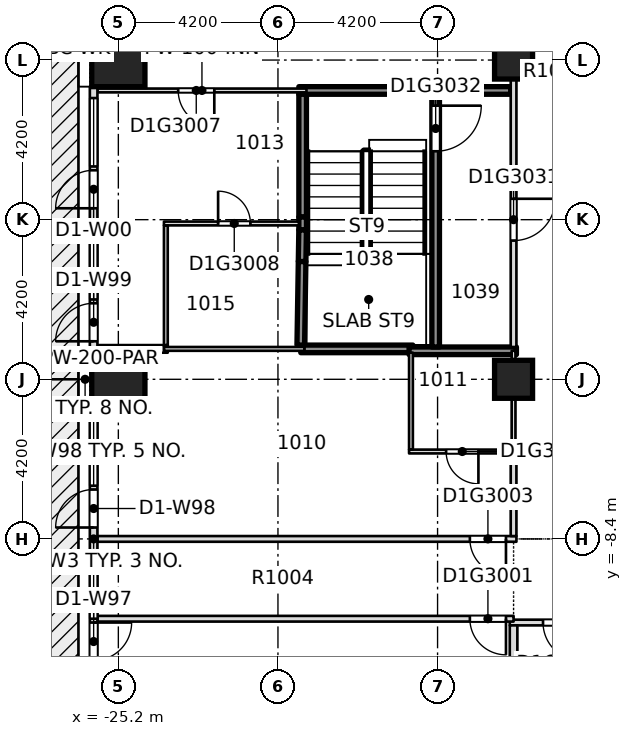
"""IFC4 building model, lengths in metres.
Left out: names, types, materials, properties, quantities, classifications, styles, units other than length and angle.
Written with IfcOpenShell. Run it as: python <this file> out.ifc"""

import sys

from ifc_helpers import new_model, si_unit, direction, frame, frame_2d, origin, origin_2d, place, context, subcontext, project, spatial, rectangle, extrude, element, fill, save


model = new_model("IFC4")
c1 = context("Model", 3, precision=1e-05, world=origin(), true_north=direction((0.0, 1.0)))
c2 = subcontext(c1, "Body", "Model", "MODEL_VIEW")
j1 = project(units=[si_unit("LENGTHUNIT", "METRE"), si_unit("PLANEANGLEUNIT", "RADIAN")], contexts=[c1])
p1 = place(None, origin())
s1 = spatial("IfcSite", under=j1, at=p1, CompositionType="ELEMENT")
p2 = place(p1, origin())
s2 = spatial("IfcBuilding", under=s1, at=p2, CompositionType="ELEMENT")
p3 = place(p2, frame((0.0, 0.0, 48.3)))
s3 = spatial("IfcBuildingStorey", under=s2, at=p3, CompositionType="ELEMENT", Elevation=48.3)
for number, where, z_axis, x_axis in (
    (1, (-25.2, -4.2, -0.32), (0.0, 0.0, 1.0), (1.0, 0.0, 0.0)),
    (2, (-25.2, 4.2, -0.32), (0.0, 0.0, 1.0), (1.0, 0.0, 0.0)),
):
    element("IfcColumn", number, at=place(p3, frame(where, z_axis=z_axis, x_axis=x_axis)), inside=s3, PredefinedType="COLUMN", context=c2, shape_type="SweptSolid", body=[
        extrude(rectangle(XDim=1.4, YDim=1.4, at=origin_2d()), origin(), (0.0, 0.0, 1.0), 3.45),
    ])
for number, where, z_axis, x_axis in (
    (3, (-14.8, -4.2, -0.32), (0.0, 0.0, 1.0), (1.0, 0.0, 0.0)),
    (4, (-14.8, 4.2, -0.32), (0.0, 0.0, 1.0), (1.0, 0.0, 0.0)),
):
    element("IfcColumn", number, at=place(p3, frame(where, z_axis=z_axis, x_axis=x_axis)), inside=s3, PredefinedType="COLUMN", context=c2, shape_type="SweptSolid", body=[
        extrude(rectangle(XDim=1.0, YDim=1.0, at=origin_2d()), origin(), (0.0, 0.0, 1.0), 3.45),
    ])
p4 = place(p3, frame((-14.9, -10.6, 0.0), z_axis=(0.0, 0.0, 1.0), x_axis=(1.0, 0.0, 0.0)))
e5 = element("IfcWall", 5, at=p4, inside=s3, PredefinedType="PARTITIONING", context=c2, shape_type="SweptSolid", body=[
    extrude(rectangle(XDim=20.8, YDim=0.15, at=frame_2d((10.4, 0.0))), origin(), (0.0, 0.0, 1.0), 3.13),
])
p5 = place(p4, frame((9.225, 0.0, 0.0)))
e6 = element("IfcOpeningElement", 6, at=p5, cuts=e5, PredefinedType="OPENING", context=c2, shape_type="SweptSolid", body=[
    extrude(rectangle(XDim=0.95, YDim=2.1, at=frame_2d((0.475, 1.05))), frame((0.0, 0.085, 0.0), z_axis=(0.0, -1.0, 0.0), x_axis=(1.0, 0.0, 0.0)), (0.0, 0.0, 1.0), 0.17),
])
p6 = place(p4, frame((18.275, 0.0, 0.0)))
e7 = element("IfcOpeningElement", 7, at=p6, cuts=e5, PredefinedType="OPENING", context=c2, shape_type="SweptSolid", body=[
    extrude(rectangle(XDim=0.95, YDim=2.1, at=frame_2d((0.475, 1.05))), frame((0.0, 0.085, 0.0), z_axis=(0.0, -1.0, 0.0), x_axis=(1.0, 0.0, 0.0)), (0.0, 0.0, 1.0), 0.17),
])
p7 = place(p4, frame((3.95, 0.0, 0.0)))
e8 = element("IfcOpeningElement", 8, at=p7, cuts=e5, PredefinedType="OPENING", context=c2, shape_type="SweptSolid", body=[
    extrude(rectangle(XDim=1.1, YDim=2.1, at=frame_2d((0.55, 1.05))), frame((0.0, 0.085, 0.0), z_axis=(0.0, -1.0, 0.0), x_axis=(1.0, 0.0, 0.0)), (0.0, 0.0, 1.0), 0.17),
])
p8 = place(p4, frame((15.5, 0.0, 0.0)))
e9 = element("IfcOpeningElement", 9, at=p8, cuts=e5, PredefinedType="OPENING", context=c2, shape_type="SweptSolid", body=[
    extrude(rectangle(XDim=1.1, YDim=2.1, at=frame_2d((0.55, 1.05))), frame((0.0, 0.085, 0.0), z_axis=(0.0, -1.0, 0.0), x_axis=(1.0, 0.0, 0.0)), (0.0, 0.0, 1.0), 0.17),
])
p9 = place(p4, frame((0.875, 0.0, 0.0)))
e10 = element("IfcOpeningElement", 10, at=p9, cuts=e5, PredefinedType="OPENING", context=c2, shape_type="SweptSolid", body=[
    extrude(rectangle(XDim=1.0, YDim=2.1, at=frame_2d((0.5, 1.05))), frame((0.0, 0.085, 0.0), z_axis=(0.0, -1.0, 0.0), x_axis=(1.0, 0.0, 0.0)), (0.0, 0.0, 1.0), 0.17),
])
p10 = place(p3, frame((-25.75, -10.5, 0.0), z_axis=(0.0, 0.0, 1.0), x_axis=(1.0, 0.0, 0.0)))
e11 = element("IfcWall", 11, at=p10, inside=s3, PredefinedType="PARTITIONING", context=c2, shape_type="SweptSolid", body=[
    extrude(rectangle(XDim=10.95, YDim=0.15, at=frame_2d((5.475, 0.0))), origin(), (0.0, 0.0, 1.0), 3.13),
])
p11 = place(p10, frame((9.8, 0.0, 0.0)))
e12 = element("IfcOpeningElement", 12, at=p11, cuts=e11, PredefinedType="OPENING", context=c2, shape_type="SweptSolid", body=[
    extrude(rectangle(XDim=0.95, YDim=2.1, at=frame_2d((0.475, 1.05))), frame((0.0, 0.085, 0.0), z_axis=(0.0, -1.0, 0.0), x_axis=(1.0, 0.0, 0.0)), (0.0, 0.0, 1.0), 0.17),
])
p12 = place(p3, frame((-25.75, -8.4, 0.0), z_axis=(0.0, 0.0, 1.0), x_axis=(1.0, 0.0, 0.0)))
e13 = element("IfcWall", 13, at=p12, inside=s3, PredefinedType="PARTITIONING", context=c2, shape_type="SweptSolid", body=[
    extrude(rectangle(XDim=11.025, YDim=0.15, at=frame_2d((5.512, 0.0))), origin(), (0.0, 0.0, 1.0), 3.13),
])
p13 = place(p12, frame((9.8, 0.0, 0.0)))
e14 = element("IfcOpeningElement", 14, at=p13, cuts=e13, PredefinedType="OPENING", context=c2, shape_type="SweptSolid", body=[
    extrude(rectangle(XDim=0.95, YDim=2.1, at=frame_2d((0.475, 1.05))), frame((0.0, 0.085, 0.0), z_axis=(0.0, -1.0, 0.0), x_axis=(1.0, 0.0, 0.0)), (0.0, 0.0, 1.0), 0.17),
])
p14 = place(p3, frame((-17.55, -6.1, 0.0), z_axis=(0.0, 0.0, 1.0), x_axis=(1.0, 0.0, 0.0)))
e15 = element("IfcWall", 15, at=p14, inside=s3, PredefinedType="PARTITIONING", context=c2, shape_type="SweptSolid", body=[
    extrude(rectangle(XDim=2.825, YDim=0.1, at=frame_2d((1.413, 0.0))), origin(), (0.0, 0.0, 1.0), 3.13),
])
p15 = place(p14, frame((0.975, 0.0, 0.0)))
e16 = element("IfcOpeningElement", 16, at=p15, cuts=e15, PredefinedType="OPENING", context=c2, shape_type="SweptSolid", body=[
    extrude(rectangle(XDim=0.85, YDim=2.1, at=frame_2d((0.425, 1.05))), frame((0.0, 0.06, 0.0), z_axis=(0.0, -1.0, 0.0), x_axis=(1.0, 0.0, 0.0)), (0.0, 0.0, 1.0), 0.12),
])
p16 = place(p3, frame((-25.75, -3.4, 0.0), z_axis=(0.0, 0.0, 1.0), x_axis=(1.0, 0.0, 0.0)))
e17 = element("IfcWall", 17, at=p16, inside=s3, PredefinedType="PARTITIONING", context=c2, shape_type="SweptSolid", body=[
    extrude(rectangle(XDim=1.85, YDim=0.2, at=frame_2d((0.925, 0.0))), origin(), (0.0, 0.0, 1.0), 3.13),
])
p17 = place(p3, frame((-24.0, -3.4, 0.0), z_axis=(0.0, 0.0, 1.0), x_axis=(1.0, 0.0, 0.0)))
e18 = element("IfcWall", 18, at=p17, inside=s3, PredefinedType="PARTITIONING", context=c2, shape_type="SweptSolid", body=[
    extrude(rectangle(XDim=3.7, YDim=0.1, at=frame_2d((1.85, 0.0))), origin(), (0.0, 0.0, 1.0), 3.13),
])
p18 = place(p3, frame((-20.4, -3.4, 0.0), z_axis=(0.0, 0.0, 1.0), x_axis=(1.0, 0.0, 0.0)))
e19 = element("IfcWall", 19, at=p18, inside=s3, PredefinedType="SOLIDWALL", context=c2, shape_type="SweptSolid", body=[
    extrude(rectangle(XDim=2.95, YDim=0.2, at=frame_2d((1.475, 0.0))), origin(), (0.0, 0.0, 1.0), 3.13),
])
p19 = place(p3, frame((-17.55, -3.45, 0.0), z_axis=(0.0, 0.0, 1.0), x_axis=(1.0, 0.0, 0.0)))
e20 = element("IfcWall", 20, at=p19, inside=s3, PredefinedType="SOLIDWALL", context=c2, shape_type="SweptSolid", body=[
    extrude(rectangle(XDim=2.825, YDim=0.2, at=frame_2d((1.413, 0.0))), origin(), (0.0, 0.0, 1.0), 3.13),
])
p20 = place(p3, frame((-24.0, -0.1, 0.0), z_axis=(0.0, 0.0, 1.0), x_axis=(1.0, 0.0, 0.0)))
e21 = element("IfcWall", 21, at=p20, inside=s3, PredefinedType="PARTITIONING", context=c2, shape_type="SweptSolid", body=[
    extrude(rectangle(XDim=3.55, YDim=0.1, at=frame_2d((1.775, 0.0))), origin(), (0.0, 0.0, 1.0), 3.13),
])
p21 = place(p20, frame((1.425, 0.0, 0.0)))
e22 = element("IfcOpeningElement", 22, at=p21, cuts=e21, PredefinedType="OPENING", context=c2, shape_type="SweptSolid", body=[
    extrude(rectangle(XDim=0.85, YDim=2.1, at=frame_2d((0.425, 1.05))), frame((0.0, 0.06, 0.0), z_axis=(0.0, -1.0, 0.0), x_axis=(1.0, 0.0, 0.0)), (0.0, 0.0, 1.0), 0.12),
])
p22 = place(p3, frame((-25.75, 3.4, 0.0), z_axis=(0.0, 0.0, 1.0), x_axis=(1.0, 0.0, 0.0)))
e23 = element("IfcWall", 23, at=p22, inside=s3, PredefinedType="PARTITIONING", context=c2, shape_type="SweptSolid", body=[
    extrude(rectangle(XDim=5.5, YDim=0.1, at=frame_2d((2.75, 0.0))), origin(), (0.0, 0.0, 1.0), 3.13),
])
p23 = place(p22, frame((2.125, 0.0, 0.0)))
e24 = element("IfcOpeningElement", 24, at=p23, cuts=e23, PredefinedType="OPENING", context=c2, shape_type="SweptSolid", body=[
    extrude(rectangle(XDim=0.95, YDim=2.1, at=frame_2d((0.475, 1.05))), frame((0.0, 0.06, 0.0), z_axis=(0.0, -1.0, 0.0), x_axis=(1.0, 0.0, 0.0)), (0.0, 0.0, 1.0), 0.12),
])
p24 = place(p3, frame((-20.45, 3.4, 0.0), z_axis=(0.0, 0.0, 1.0), x_axis=(1.0, 0.0, 0.0)))
e25 = element("IfcWall", 25, at=p24, inside=s3, PredefinedType="SOLIDWALL", context=c2, shape_type="SweptSolid", body=[
    extrude(rectangle(XDim=5.575, YDim=0.2, at=frame_2d((2.788, 0.0))), origin(), (0.0, 0.0, 1.0), 3.13),
])
p25 = place(p3, frame((-23.95, -3.3, 0.0), z_axis=(0.0, 0.0, 1.0), x_axis=(0.0, 1.0, 0.0)))
e26 = element("IfcWall", 26, at=p25, inside=s3, PredefinedType="PARTITIONING", context=c2, shape_type="SweptSolid", body=[
    extrude(rectangle(XDim=3.15, YDim=0.1, at=frame_2d((1.575, 0.0))), origin(), (0.0, 0.0, 1.0), 3.13),
])
p26 = place(p3, frame((-20.4, -3.3, 0.0), z_axis=(0.0, 0.0, 1.0), x_axis=(0.016200292967, 0.999868766643, 0.0)))
e27 = element("IfcWall", 27, at=p26, inside=s3, PredefinedType="SOLIDWALL", context=c2, shape_type="SweptSolid", body=[
    extrude(rectangle(XDim=2.2, YDim=0.2, at=frame_2d((1.1, 0.0))), origin(), (0.0, 0.0, 1.0), 3.13),
])
p27 = place(p3, frame((-20.35, 0.07, 0.0), z_axis=(0.0, 0.0, 1.0), x_axis=(0.0, 1.0, 0.0)))
e28 = element("IfcWall", 28, at=p27, inside=s3, PredefinedType="SOLIDWALL", context=c2, shape_type="SweptSolid", body=[
    extrude(rectangle(XDim=3.23, YDim=0.2, at=frame_2d((1.615, 0.0))), origin(), (0.0, 0.0, 1.0), 3.13),
])
p28 = place(p3, frame((-17.5, -6.05, 0.0), z_axis=(0.0, 0.0, 1.0), x_axis=(0.0, 1.0, 0.0)))
e29 = element("IfcWall", 29, at=p28, inside=s3, PredefinedType="PARTITIONING", context=c2, shape_type="SweptSolid", body=[
    extrude(rectangle(XDim=2.55, YDim=0.1, at=frame_2d((1.275, 0.0))), origin(), (0.0, 0.0, 1.0), 3.13),
])
p29 = place(p3, frame((-16.85, -3.35, 0.0), z_axis=(0.0, 0.0, 1.0), x_axis=(0.0, 1.0, 0.0)))
e30 = element("IfcWall", 30, at=p29, inside=s3, PredefinedType="SOLIDWALL", context=c2, shape_type="SweptSolid", body=[
    extrude(rectangle(XDim=6.65, YDim=0.2, at=frame_2d((3.325, 0.0))), origin(), (0.0, 0.0, 1.0), 3.13),
])
p30 = place(p29, frame((5.15, 0.0, 0.0)))
e31 = element("IfcOpeningElement", 31, at=p30, cuts=e30, PredefinedType="OPENING", context=c2, shape_type="SweptSolid", body=[
    extrude(rectangle(XDim=1.2, YDim=2.1, at=frame_2d((0.6, 1.05))), frame((0.0, 0.11, 0.0), z_axis=(0.0, -1.0, 0.0), x_axis=(1.0, 0.0, 0.0)), (0.0, 0.0, 1.0), 0.22),
])
p31 = place(p3, frame((-14.8, -19.3, 0.0), z_axis=(0.0, 0.0, 1.0), x_axis=(0.0, 1.0, 0.0)))
e32 = element("IfcWall", 32, at=p31, inside=s3, PredefinedType="PARTITIONING", context=c2, shape_type="SweptSolid", body=[
    extrude(rectangle(XDim=8.625, YDim=0.2, at=frame_2d((4.312, 0.0))), origin(), (0.0, 0.0, 1.0), 3.13),
])
p32 = place(p3, frame((-14.8, -8.325, 0.0), z_axis=(0.0, 0.0, 1.0), x_axis=(0.0, 1.0, 0.0)))
e33 = element("IfcWall", 33, at=p32, inside=s3, PredefinedType="PARTITIONING", context=c2, shape_type="SweptSolid", body=[
    extrude(rectangle(XDim=2.175, YDim=0.15, at=frame_2d((1.087, 0.0))), origin(), (0.0, 0.0, 1.0), 3.13),
])
p33 = place(p3, frame((-14.8, -6.05, 0.0), z_axis=(0.0, 0.0, 1.0), x_axis=(0.0, 1.0, 0.0)))
e34 = element("IfcWall", 34, at=p33, inside=s3, PredefinedType="PARTITIONING", context=c2, shape_type="SweptSolid", body=[
    extrude(rectangle(XDim=2.6, YDim=0.1, at=frame_2d((1.3, 0.0))), origin(), (0.0, 0.0, 1.0), 3.13),
])
p34 = place(p3, frame((-14.8, -3.35, 0.0), z_axis=(0.0, 0.0, 1.0), x_axis=(0.0, 1.0, 0.0)))
e35 = element("IfcWall", 35, at=p34, inside=s3, PredefinedType="PARTITIONING", context=c2, shape_type="SweptSolid", body=[
    extrude(rectangle(XDim=11.675, YDim=0.15, at=frame_2d((5.837, 0.0))), origin(), (0.0, 0.0, 1.0), 3.13),
])
p35 = place(p34, frame((2.8, 0.0, 0.0)))
e36 = element("IfcOpeningElement", 36, at=p35, cuts=e35, PredefinedType="OPENING", context=c2, shape_type="SweptSolid", body=[
    extrude(rectangle(XDim=1.1, YDim=2.1, at=frame_2d((0.55, 1.05))), frame((0.0, 0.085, 0.0), z_axis=(0.0, -1.0, 0.0), x_axis=(1.0, 0.0, 0.0)), (0.0, 0.0, 1.0), 0.17),
])
p36 = place(p3, frame((-25.85, 3.5, 0.0), z_axis=(0.0, 0.0, 1.0), x_axis=(0.0, -1.0, 0.0)))
e37 = element("IfcWall", 37, at=p36, inside=s3, PredefinedType="STANDARD", context=c2, shape_type="SweptSolid", body=[
    extrude(rectangle(XDim=7.0, YDim=0.2, at=frame_2d((3.5, 0.0))), origin(), (0.0, 0.0, 1.0), 3.13),
])
p37 = place(p36, frame((3.8, 0.0, 0.2)))
e38 = element("IfcOpeningElement", 38, at=p37, cuts=e37, PredefinedType="OPENING", context=c2, shape_type="SweptSolid", body=[
    extrude(rectangle(XDim=1.8, YDim=2.65, at=frame_2d((0.9, 1.325))), frame((0.0, 0.11, 0.0), z_axis=(0.0, -1.0, 0.0), x_axis=(1.0, 0.0, 0.0)), (0.0, 0.0, 1.0), 0.22),
])
p38 = place(p36, frame((5.7, 0.0, 0.0)))
e39 = element("IfcOpeningElement", 39, at=p38, cuts=e37, PredefinedType="OPENING", context=c2, shape_type="SweptSolid", body=[
    extrude(rectangle(XDim=1.0, YDim=2.4, at=frame_2d((0.5, 1.2))), frame((0.0, 0.11, 0.0), z_axis=(0.0, -1.0, 0.0), x_axis=(1.0, 0.0, 0.0)), (0.0, 0.0, 1.0), 0.22),
])
p39 = place(p36, frame((0.3, 0.0, 0.2)))
e40 = element("IfcOpeningElement", 40, at=p39, cuts=e37, PredefinedType="OPENING", context=c2, shape_type="SweptSolid", body=[
    extrude(rectangle(XDim=1.8, YDim=2.65, at=frame_2d((0.9, 1.325))), frame((0.0, 0.11, 0.0), z_axis=(0.0, -1.0, 0.0), x_axis=(1.0, 0.0, 0.0)), (0.0, 0.0, 1.0), 0.22),
])
p40 = place(p36, frame((2.2, 0.0, 0.0)))
e41 = element("IfcOpeningElement", 41, at=p40, cuts=e37, PredefinedType="OPENING", context=c2, shape_type="SweptSolid", body=[
    extrude(rectangle(XDim=1.0, YDim=2.4, at=frame_2d((0.5, 1.2))), frame((0.0, 0.11, 0.0), z_axis=(0.0, -1.0, 0.0), x_axis=(1.0, 0.0, 0.0)), (0.0, 0.0, 1.0), 0.22),
])
p41 = place(p3, frame((-25.85, -4.9, 0.0), z_axis=(0.0, 0.0, 1.0), x_axis=(0.0, -1.0, 0.0)))
e42 = element("IfcWall", 42, at=p41, inside=s3, PredefinedType="STANDARD", context=c2, shape_type="SweptSolid", body=[
    extrude(rectangle(XDim=7.0, YDim=0.2, at=frame_2d((3.5, 0.0))), origin(), (0.0, 0.0, 1.0), 3.13),
])
p42 = place(p41, frame((3.8, 0.0, 0.2)))
e43 = element("IfcOpeningElement", 43, at=p42, cuts=e42, PredefinedType="OPENING", context=c2, shape_type="SweptSolid", body=[
    extrude(rectangle(XDim=1.8, YDim=2.65, at=frame_2d((0.9, 1.325))), frame((0.0, 0.11, 0.0), z_axis=(0.0, -1.0, 0.0), x_axis=(1.0, 0.0, 0.0)), (0.0, 0.0, 1.0), 0.22),
])
p43 = place(p41, frame((5.7, 0.0, 0.0)))
e44 = element("IfcOpeningElement", 44, at=p43, cuts=e42, PredefinedType="OPENING", context=c2, shape_type="SweptSolid", body=[
    extrude(rectangle(XDim=1.0, YDim=2.4, at=frame_2d((0.5, 1.2))), frame((0.0, 0.11, 0.0), z_axis=(0.0, -1.0, 0.0), x_axis=(1.0, 0.0, 0.0)), (0.0, 0.0, 1.0), 0.22),
])
p44 = place(p41, frame((0.3, 0.0, 0.2)))
e45 = element("IfcOpeningElement", 45, at=p44, cuts=e42, PredefinedType="OPENING", context=c2, shape_type="SweptSolid", body=[
    extrude(rectangle(XDim=1.8, YDim=2.65, at=frame_2d((0.9, 1.325))), frame((0.0, 0.11, 0.0), z_axis=(0.0, -1.0, 0.0), x_axis=(1.0, 0.0, 0.0)), (0.0, 0.0, 1.0), 0.22),
])
p45 = place(p41, frame((2.2, 0.0, 0.0)))
e46 = element("IfcOpeningElement", 46, at=p45, cuts=e42, PredefinedType="OPENING", context=c2, shape_type="SweptSolid", body=[
    extrude(rectangle(XDim=1.0, YDim=2.4, at=frame_2d((0.5, 1.2))), frame((0.0, 0.11, 0.0), z_axis=(0.0, -1.0, 0.0), x_axis=(1.0, 0.0, 0.0)), (0.0, 0.0, 1.0), 0.22),
])
p46 = place(p3, frame((-20.35, -0.27, 0.0), z_axis=(0.0, 0.0, 1.0), x_axis=(0.0, 1.0, 0.0)))
e47 = element("IfcWall", 47, at=p46, inside=s3, PredefinedType="SOLIDWALL", context=c2, shape_type="SweptSolid", body=[
    extrude(rectangle(XDim=0.34, YDim=0.2, at=frame_2d((0.17, 0.0))), origin(), (0.0, 0.0, 1.0), 3.13),
])
p47 = place(p3, frame((-20.365, -1.1, 0.0), z_axis=(0.0, 0.0, 1.0), x_axis=(0.015880350165, 0.999873899289, 0.0)))
e48 = element("IfcWall", 48, at=p47, inside=s3, PredefinedType="SOLIDWALL", context=c2, shape_type="SweptSolid", body=[
    extrude(rectangle(XDim=0.83, YDim=0.2, at=frame_2d((0.415, 0.0))), origin(), (0.0, 0.0, 1.0), 3.13),
])
p48 = place(p11, origin())
e49 = element("IfcDoor", 49, at=p48, inside=s3, OperationType="SINGLE_SWING_RIGHT", PredefinedType="DOOR", context=c2, shape_type="SweptSolid", body=[
    extrude(rectangle(XDim=0.95, YDim=2.1, at=frame_2d((0.475, 1.05))), frame((0.0, 0.025, 0.0), z_axis=(0.0, -1.0, 0.0), x_axis=(1.0, 0.0, 0.0)), (0.0, 0.0, 1.0), 0.05),
])
fill(e12, e49)
p49 = place(p13, origin())
e50 = element("IfcDoor", 50, at=p49, inside=s3, OperationType="SINGLE_SWING_LEFT", PredefinedType="DOOR", context=c2, shape_type="SweptSolid", body=[
    extrude(rectangle(XDim=0.95, YDim=2.1, at=frame_2d((0.475, 1.05))), frame((0.0, 0.025, 0.0), z_axis=(0.0, -1.0, 0.0), x_axis=(1.0, 0.0, 0.0)), (0.0, 0.0, 1.0), 0.05),
])
fill(e14, e50)
p50 = place(p15, origin())
e51 = element("IfcDoor", 51, at=p50, inside=s3, OperationType="SINGLE_SWING_LEFT", PredefinedType="DOOR", context=c2, shape_type="SweptSolid", body=[
    extrude(rectangle(XDim=0.85, YDim=2.1, at=frame_2d((0.425, 1.05))), frame((0.0, 0.025, 0.0), z_axis=(0.0, -1.0, 0.0), x_axis=(1.0, 0.0, 0.0)), (0.0, 0.0, 1.0), 0.05),
])
fill(e16, e51)
p51 = place(p23, origin())
e52 = element("IfcDoor", 52, at=p51, inside=s3, OperationType="SINGLE_SWING_LEFT", PredefinedType="DOOR", context=c2, shape_type="SweptSolid", body=[
    extrude(rectangle(XDim=0.95, YDim=2.1, at=frame_2d((0.475, 1.05))), frame((0.0, 0.025, 0.0), z_axis=(0.0, -1.0, 0.0), x_axis=(1.0, 0.0, 0.0)), (0.0, 0.0, 1.0), 0.05),
])
fill(e24, e52)
p52 = place(p21, origin())
e53 = element("IfcDoor", 53, at=p52, inside=s3, OperationType="SINGLE_SWING_RIGHT", PredefinedType="DOOR", context=c2, shape_type="SweptSolid", body=[
    extrude(rectangle(XDim=0.85, YDim=2.1, at=frame_2d((0.425, 1.05))), frame((0.0, 0.025, 0.0), z_axis=(0.0, -1.0, 0.0), x_axis=(1.0, 0.0, 0.0)), (0.0, 0.0, 1.0), 0.05),
])
fill(e22, e53)
p53 = place(p35, origin())
e54 = element("IfcDoor", 54, at=p53, inside=s3, OperationType="SINGLE_SWING_RIGHT", PredefinedType="DOOR", context=c2, shape_type="SweptSolid", body=[
    extrude(rectangle(XDim=1.1, YDim=2.1, at=frame_2d((0.55, 1.05))), frame((0.0, 0.025, 0.0), z_axis=(0.0, -1.0, 0.0), x_axis=(1.0, 0.0, 0.0)), (0.0, 0.0, 1.0), 0.05),
])
fill(e36, e54)
p54 = place(p30, origin())
e55 = element("IfcDoor", 55, at=p54, inside=s3, OperationType="SINGLE_SWING_RIGHT", PredefinedType="DOOR", context=c2, shape_type="SweptSolid", body=[
    extrude(rectangle(XDim=1.2, YDim=2.1, at=frame_2d((0.6, 1.05))), frame((0.0, 0.025, 0.0), z_axis=(0.0, -1.0, 0.0), x_axis=(1.0, 0.0, 0.0)), (0.0, 0.0, 1.0), 0.05),
])
fill(e31, e55)
p55 = place(p9, origin())
e56 = element("IfcDoor", 56, at=p55, inside=s3, OperationType="SINGLE_SWING_RIGHT", PredefinedType="DOOR", context=c2, shape_type="SweptSolid", body=[
    extrude(rectangle(XDim=1.0, YDim=2.1, at=frame_2d((0.5, 1.05))), frame((0.0, 0.025, 0.0), z_axis=(0.0, -1.0, 0.0), x_axis=(1.0, 0.0, 0.0)), (0.0, 0.0, 1.0), 0.05),
])
fill(e10, e56)
p56 = place(p37, origin())
e57 = element("IfcWindow", 57, at=p56, inside=s3, PartitioningType="SINGLE_PANEL", PredefinedType="WINDOW", context=c2, shape_type="SweptSolid", body=[
    extrude(rectangle(XDim=1.8, YDim=2.65, at=frame_2d((0.9, 1.325))), frame((0.0, 0.03, 0.0), z_axis=(0.0, -1.0, 0.0), x_axis=(1.0, 0.0, 0.0)), (0.0, 0.0, 1.0), 0.06),
])
fill(e38, e57)
p57 = place(p38, origin())
e58 = element("IfcDoor", 58, at=p57, inside=s3, OperationType="SINGLE_SWING_LEFT", PredefinedType="DOOR", context=c2, shape_type="SweptSolid", body=[
    extrude(rectangle(XDim=1.0, YDim=2.4, at=frame_2d((0.5, 1.2))), frame((0.0, 0.025, 0.0), z_axis=(0.0, -1.0, 0.0), x_axis=(1.0, 0.0, 0.0)), (0.0, 0.0, 1.0), 0.05),
])
fill(e39, e58)
p58 = place(p39, origin())
e59 = element("IfcWindow", 59, at=p58, inside=s3, PartitioningType="SINGLE_PANEL", PredefinedType="WINDOW", context=c2, shape_type="SweptSolid", body=[
    extrude(rectangle(XDim=1.8, YDim=2.65, at=frame_2d((0.9, 1.325))), frame((0.0, 0.03, 0.0), z_axis=(0.0, -1.0, 0.0), x_axis=(1.0, 0.0, 0.0)), (0.0, 0.0, 1.0), 0.06),
])
fill(e40, e59)
p59 = place(p40, origin())
e60 = element("IfcDoor", 60, at=p59, inside=s3, OperationType="SINGLE_SWING_LEFT", PredefinedType="DOOR", context=c2, shape_type="SweptSolid", body=[
    extrude(rectangle(XDim=1.0, YDim=2.4, at=frame_2d((0.5, 1.2))), frame((0.0, 0.025, 0.0), z_axis=(0.0, -1.0, 0.0), x_axis=(1.0, 0.0, 0.0)), (0.0, 0.0, 1.0), 0.05),
])
fill(e41, e60)
p60 = place(p42, origin())
e61 = element("IfcWindow", 61, at=p60, inside=s3, PartitioningType="SINGLE_PANEL", PredefinedType="WINDOW", context=c2, shape_type="SweptSolid", body=[
    extrude(rectangle(XDim=1.8, YDim=2.65, at=frame_2d((0.9, 1.325))), frame((0.0, 0.03, 0.0), z_axis=(0.0, -1.0, 0.0), x_axis=(1.0, 0.0, 0.0)), (0.0, 0.0, 1.0), 0.06),
])
fill(e43, e61)
p61 = place(p43, origin())
e62 = element("IfcDoor", 62, at=p61, inside=s3, OperationType="SINGLE_SWING_LEFT", PredefinedType="DOOR", context=c2, shape_type="SweptSolid", body=[
    extrude(rectangle(XDim=1.0, YDim=2.4, at=frame_2d((0.5, 1.2))), frame((0.0, 0.025, 0.0), z_axis=(0.0, -1.0, 0.0), x_axis=(1.0, 0.0, 0.0)), (0.0, 0.0, 1.0), 0.05),
])
fill(e44, e62)
p62 = place(p44, origin())
e63 = element("IfcWindow", 63, at=p62, inside=s3, PartitioningType="SINGLE_PANEL", PredefinedType="WINDOW", context=c2, shape_type="SweptSolid", body=[
    extrude(rectangle(XDim=1.8, YDim=2.65, at=frame_2d((0.9, 1.325))), frame((0.0, 0.03, 0.0), z_axis=(0.0, -1.0, 0.0), x_axis=(1.0, 0.0, 0.0)), (0.0, 0.0, 1.0), 0.06),
])
fill(e45, e63)
p63 = place(p45, origin())
e64 = element("IfcDoor", 64, at=p63, inside=s3, OperationType="SINGLE_SWING_LEFT", PredefinedType="DOOR", context=c2, shape_type="SweptSolid", body=[
    extrude(rectangle(XDim=1.0, YDim=2.4, at=frame_2d((0.5, 1.2))), frame((0.0, 0.025, 0.0), z_axis=(0.0, -1.0, 0.0), x_axis=(1.0, 0.0, 0.0)), (0.0, 0.0, 1.0), 0.05),
])
fill(e46, e64)
save(model, sys.argv[1])
